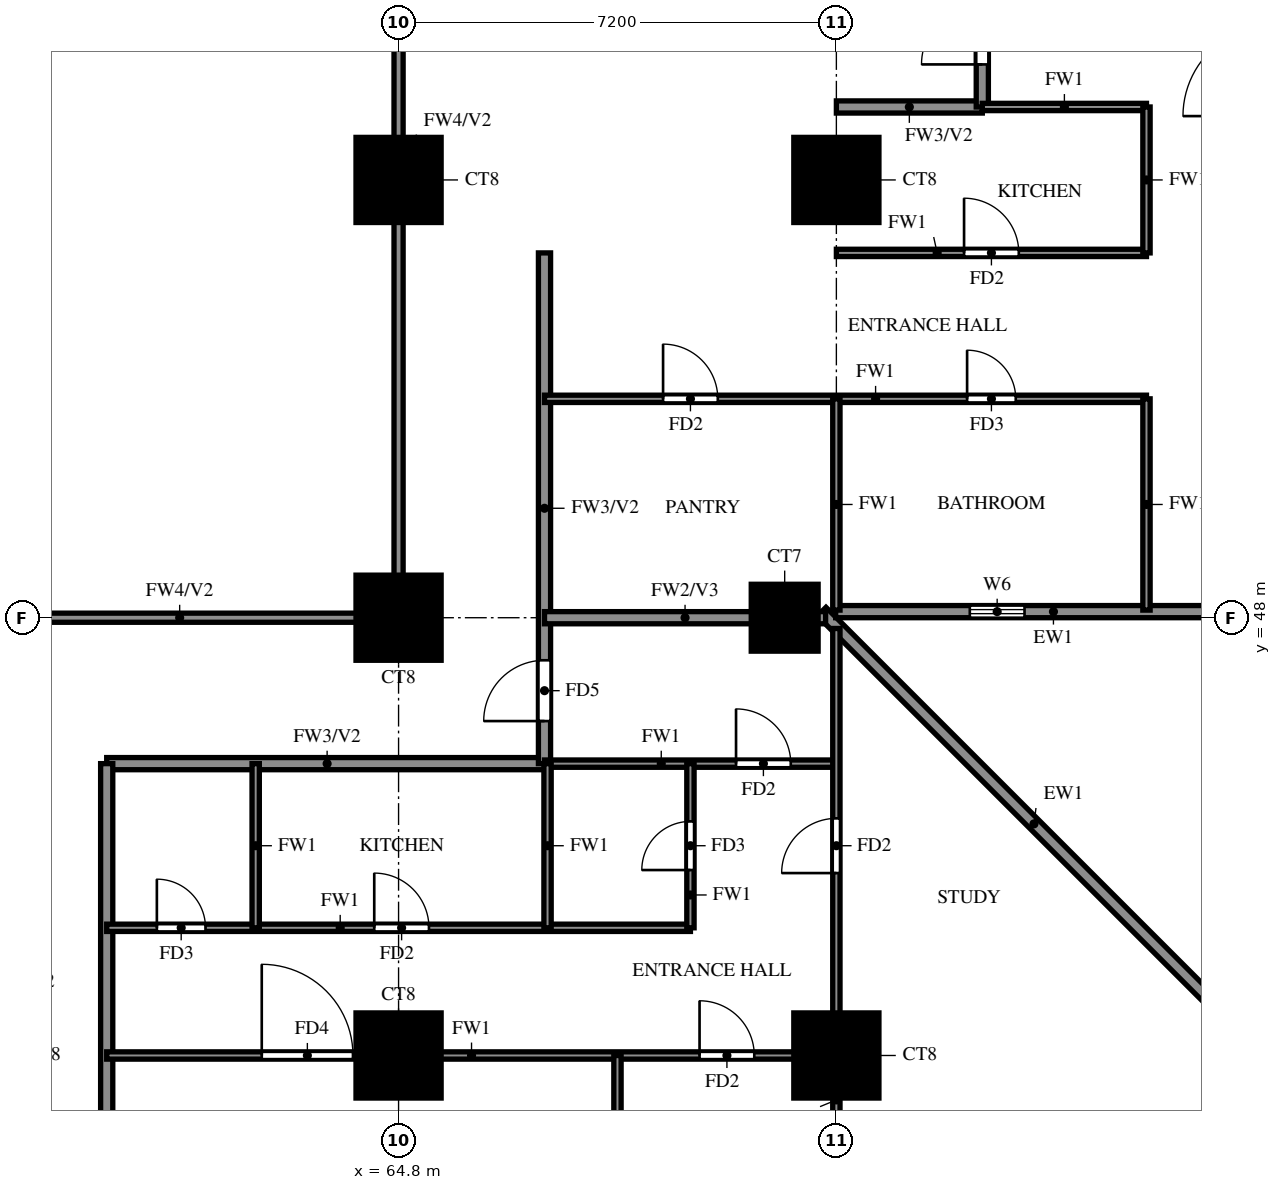
"""IFC4 building model, lengths in metres.
Left out: names, types, materials, properties, quantities, classifications, styles, units other than length and angle.
Written with IfcOpenShell. Run it as: python <this file> out.ifc"""

import sys

from ifc_helpers import new_model, si_unit, direction, frame, frame_2d, origin, origin_2d, place, context, subcontext, project, spatial, rectangle, extrude, source, transform, mapped, element, fill, save


model = new_model("IFC4")
c1 = context("Model", 3, precision=1e-05, world=origin(), true_north=direction((0.0, 1.0)))
c2 = subcontext(c1, "Body", "Model", "MODEL_VIEW")
j1 = project(units=[si_unit("LENGTHUNIT", "METRE"), si_unit("PLANEANGLEUNIT", "RADIAN")], contexts=[c1])
p1 = place(None, origin())
s1 = spatial("IfcSite", under=j1, at=p1, CompositionType="ELEMENT")
p2 = place(p1, origin())
s2 = spatial("IfcBuilding", under=s1, at=p2, CompositionType="ELEMENT")
p3 = place(p2, frame((0.0, 0.0, 30.5)))
s3 = spatial("IfcBuildingStorey", under=s2, at=p3, CompositionType="ELEMENT", Elevation=30.5)
m1 = source(origin(), c2, "Body", "SweptSolid", [
    extrude(rectangle(XDim=1.4, YDim=1.4, at=origin_2d()), origin(), (0.0, 0.0, 1.0), 3.18),
])
for number, where, z_axis, x_axis in (
    (1, (64.8, 40.8, 0.0), (0.0, 0.0, 1.0), (1.0, 0.0, 0.0)),
    (2, (72.0, 40.8, 0.0), (0.0, 0.0, 1.0), (1.0, 0.0, 0.0)),
    (3, (64.8, 48.0, 0.0), (0.0, 0.0, 1.0), (1.0, 0.0, 0.0)),
):
    element("IfcColumn", number, at=place(p3, frame(where, z_axis=z_axis, x_axis=x_axis)), inside=s3, PredefinedType="COLUMN", context=c2, shape_type="MappedRepresentation", body=[
        mapped(m1, transform((0.0, 0.0, 0.0))),
    ])
m2 = source(origin(), c2, "Body", "SweptSolid", [
    extrude(rectangle(XDim=1.1, YDim=1.1, at=origin_2d()), origin(), (0.0, 0.0, 1.0), 3.18),
])
p4 = place(p3, frame((71.15, 48.0, 0.0), z_axis=(0.0, 0.0, 1.0), x_axis=(1.0, 0.0, 0.0)))
e4 = element("IfcColumn", 4, at=p4, inside=s3, PredefinedType="COLUMN", context=c2, shape_type="MappedRepresentation", body=[
    mapped(m2, transform((0.0, 0.0, 0.0))),
])
for number, where, z_axis, x_axis in (
    (5, (64.8, 55.2, 0.0), (0.0, 0.0, 1.0), (1.0, 0.0, 0.0)),
    (6, (72.0, 55.2, 0.0), (0.0, 0.0, 1.0), (1.0, 0.0, 0.0)),
):
    element("IfcColumn", number, at=place(p3, frame(where, z_axis=z_axis, x_axis=x_axis)), inside=s3, PredefinedType="COLUMN", context=c2, shape_type="MappedRepresentation", body=[
        mapped(m1, transform((0.0, 0.0, 0.0))),
    ])
p5 = place(p3, frame((78.74, 41.118, 0.0), z_axis=(0.0, 0.0, 1.0), x_axis=(-0.707106781187, 0.707106781187, 0.0)))
e7 = element("IfcWall", 7, at=p5, inside=s3, PredefinedType="SOLIDWALL", context=c2, shape_type="SweptSolid", body=[
    extrude(rectangle(XDim=9.874, YDim=0.2, at=frame_2d((4.937, 0.0))), origin(), (0.0, 0.0, 1.0), 3.18),
])
p6 = place(p3, frame((71.989, 48.1, 0.0), z_axis=(0.0, 0.0, 1.0), x_axis=(1.0, 0.0, 0.0)))
e8 = element("IfcWall", 8, at=p6, inside=s3, PredefinedType="SOLIDWALL", context=c2, shape_type="SweptSolid", body=[
    extrude(rectangle(XDim=6.511, YDim=0.2, at=frame_2d((3.256, 0.0))), origin(), (0.0, 0.0, 1.0), 3.18),
])
p7 = place(p6, frame((2.206, 0.0, 1.5)))
e9 = element("IfcOpeningElement", 9, at=p7, cuts=e8, PredefinedType="OPENING", context=c2, shape_type="SweptSolid", body=[
    extrude(rectangle(XDim=0.9, YDim=0.9, at=frame_2d((0.45, 0.45))), frame((0.0, 0.11, 0.0), z_axis=(0.0, -1.0, 0.0), x_axis=(1.0, 0.0, 0.0)), (0.0, 0.0, 1.0), 0.22),
])
p8 = place(p3, frame((60.0, 45.6, 0.0), z_axis=(0.0, 0.0, 1.0), x_axis=(1.0, 0.0, 0.0)))
e10 = element("IfcWall", 10, at=p8, inside=s3, PredefinedType="SOLIDWALL", context=c2, shape_type="SweptSolid", body=[
    extrude(rectangle(XDim=7.25, YDim=0.2, at=frame_2d((3.625, 0.0))), origin(), (0.0, 0.0, 1.0), 3.18),
])
p9 = place(p3, frame((72.0, 56.4, 0.0), z_axis=(0.0, 0.0, 1.0), x_axis=(1.0, 0.0, 0.0)))
e11 = element("IfcWall", 11, at=p9, inside=s3, PredefinedType="SOLIDWALL", context=c2, shape_type="SweptSolid", body=[
    extrude(rectangle(XDim=2.4, YDim=0.2, at=frame_2d((1.2, 0.0))), origin(), (0.0, 0.0, 1.0), 3.18),
])
p10 = place(p3, frame((60.0, 33.725, 0.0), z_axis=(0.0, 0.0, 1.0), x_axis=(0.0, 1.0, 0.0)))
e12 = element("IfcWall", 12, at=p10, inside=s3, PredefinedType="SOLIDWALL", context=c2, shape_type="SweptSolid", body=[
    extrude(rectangle(XDim=11.875, YDim=0.2, at=frame_2d((5.938, 0.0))), origin(), (0.0, 0.0, 1.0), 2.28),
])
p11 = place(p3, frame((67.2, 45.6, 0.0), z_axis=(0.0, 0.0, 1.0), x_axis=(0.0, 1.0, 0.0)))
e13 = element("IfcWall", 13, at=p11, inside=s3, PredefinedType="SOLIDWALL", context=c2, shape_type="SweptSolid", body=[
    extrude(rectangle(XDim=8.4, YDim=0.2, at=frame_2d((4.2, 0.0))), origin(), (0.0, 0.0, 1.0), 3.18),
])
p12 = place(p11, frame((0.7, 0.0, 0.0)))
e14 = element("IfcOpeningElement", 14, at=p12, cuts=e13, PredefinedType="OPENING", context=c2, shape_type="SweptSolid", body=[
    extrude(rectangle(XDim=1.0, YDim=2.1, at=frame_2d((0.5, 1.05))), frame((0.0, 0.11, 0.0), z_axis=(0.0, -1.0, 0.0), x_axis=(1.0, 0.0, 0.0)), (0.0, 0.0, 1.0), 0.22),
])
p13 = place(p3, frame((74.4, 56.4, 0.0), z_axis=(0.0, 0.0, 1.0), x_axis=(0.0, 1.0, 0.0)))
e15 = element("IfcWall", 15, at=p13, inside=s3, PredefinedType="SOLIDWALL", context=c2, shape_type="SweptSolid", body=[
    extrude(rectangle(XDim=9.6, YDim=0.2, at=frame_2d((4.8, 0.0))), origin(), (0.0, 0.0, 1.0), 3.18),
])
p14 = place(p13, frame((0.7, 0.0, 0.0)))
e16 = element("IfcOpeningElement", 16, at=p14, cuts=e15, PredefinedType="OPENING", context=c2, shape_type="SweptSolid", body=[
    extrude(rectangle(XDim=1.0, YDim=2.1, at=frame_2d((0.5, 1.05))), frame((0.0, 0.11, 0.0), z_axis=(0.0, -1.0, 0.0), x_axis=(1.0, 0.0, 0.0)), (0.0, 0.0, 1.0), 0.22),
])
p15 = place(p13, frame((3.1, 0.0, 0.0)))
e17 = element("IfcOpeningElement", 17, at=p15, cuts=e15, PredefinedType="OPENING", context=c2, shape_type="SweptSolid", body=[
    extrude(rectangle(XDim=1.0, YDim=2.1, at=frame_2d((0.5, 1.05))), frame((0.0, 0.11, 0.0), z_axis=(0.0, -1.0, 0.0), x_axis=(1.0, 0.0, 0.0)), (0.0, 0.0, 1.0), 0.22),
])
p16 = place(p3, frame((67.2, 48.0, 0.0), z_axis=(0.0, 0.0, 1.0), x_axis=(1.0, 0.0, 0.0)))
e18 = element("IfcWall", 18, at=p16, inside=s3, PredefinedType="SOLIDWALL", context=c2, shape_type="SweptSolid", body=[
    extrude(rectangle(XDim=4.623, YDim=0.2, at=frame_2d((2.312, 0.0))), origin(), (0.0, 0.0, 1.0), 3.18),
])
p17 = place(p3, frame((60.0, 40.8, 0.0), z_axis=(0.0, 0.0, 1.0), x_axis=(1.0, 0.0, 0.0)))
e19 = element("IfcWall", 19, at=p17, inside=s3, PredefinedType="PARTITIONING", context=c2, shape_type="SweptSolid", body=[
    extrude(rectangle(XDim=12.0, YDim=0.12, at=frame_2d((6.0, 0.0))), origin(), (0.0, 0.0, 1.0), 3.18),
])
p18 = place(p17, frame((9.75, 0.0, 0.0)))
e20 = element("IfcOpeningElement", 20, at=p18, cuts=e19, PredefinedType="OPENING", context=c2, shape_type="SweptSolid", body=[
    extrude(rectangle(XDim=0.9, YDim=2.1, at=frame_2d((0.45, 1.05))), frame((0.0, 0.07, 0.0), z_axis=(0.0, -1.0, 0.0), x_axis=(1.0, 0.0, 0.0)), (0.0, 0.0, 1.0), 0.14),
])
p19 = place(p17, frame((2.55, 0.0, 0.0)))
e21 = element("IfcOpeningElement", 21, at=p19, cuts=e19, PredefinedType="OPENING", context=c2, shape_type="SweptSolid", body=[
    extrude(rectangle(XDim=1.5, YDim=2.1, at=frame_2d((0.75, 1.05))), frame((0.0, 0.07, 0.0), z_axis=(0.0, -1.0, 0.0), x_axis=(1.0, 0.0, 0.0)), (0.0, 0.0, 1.0), 0.14),
])
p20 = place(p3, frame((60.0, 42.9, 0.0), z_axis=(0.0, 0.0, 1.0), x_axis=(1.0, 0.0, 0.0)))
e22 = element("IfcWall", 22, at=p20, inside=s3, PredefinedType="PARTITIONING", context=c2, shape_type="SweptSolid", body=[
    extrude(rectangle(XDim=9.6, YDim=0.12, at=frame_2d((4.8, 0.0))), origin(), (0.0, 0.0, 1.0), 3.18),
])
p21 = place(p20, frame((4.4, 0.0, 0.0)))
e23 = element("IfcOpeningElement", 23, at=p21, cuts=e22, PredefinedType="OPENING", context=c2, shape_type="SweptSolid", body=[
    extrude(rectangle(XDim=0.9, YDim=2.1, at=frame_2d((0.45, 1.05))), frame((0.0, 0.07, 0.0), z_axis=(0.0, -1.0, 0.0), x_axis=(1.0, 0.0, 0.0)), (0.0, 0.0, 1.0), 0.14),
])
p22 = place(p20, frame((0.825, 0.0, 0.0)))
e24 = element("IfcOpeningElement", 24, at=p22, cuts=e22, PredefinedType="OPENING", context=c2, shape_type="SweptSolid", body=[
    extrude(rectangle(XDim=0.8, YDim=2.1, at=frame_2d((0.4, 1.05))), frame((0.0, 0.07, 0.0), z_axis=(0.0, -1.0, 0.0), x_axis=(1.0, 0.0, 0.0)), (0.0, 0.0, 1.0), 0.14),
])
p23 = place(p3, frame((67.2, 45.6, 0.0), z_axis=(0.0, 0.0, 1.0), x_axis=(1.0, 0.0, 0.0)))
e25 = element("IfcWall", 25, at=p23, inside=s3, PredefinedType="PARTITIONING", context=c2, shape_type="SweptSolid", body=[
    extrude(rectangle(XDim=4.8, YDim=0.12, at=frame_2d((2.4, 0.0))), origin(), (0.0, 0.0, 1.0), 3.18),
])
p24 = place(p23, frame((3.15, 0.0, 0.0)))
e26 = element("IfcOpeningElement", 26, at=p24, cuts=e25, PredefinedType="OPENING", context=c2, shape_type="SweptSolid", body=[
    extrude(rectangle(XDim=0.9, YDim=2.1, at=frame_2d((0.45, 1.05))), frame((0.0, 0.07, 0.0), z_axis=(0.0, -1.0, 0.0), x_axis=(1.0, 0.0, 0.0)), (0.0, 0.0, 1.0), 0.14),
])
p25 = place(p3, frame((67.2, 51.6, 0.0), z_axis=(0.0, 0.0, 1.0), x_axis=(1.0, 0.0, 0.0)))
e27 = element("IfcWall", 27, at=p25, inside=s3, PredefinedType="PARTITIONING", context=c2, shape_type="SweptSolid", body=[
    extrude(rectangle(XDim=9.9, YDim=0.12, at=frame_2d((4.95, 0.0))), origin(), (0.0, 0.0, 1.0), 3.18),
])
p26 = place(p25, frame((6.95, 0.0, 0.0)))
e28 = element("IfcOpeningElement", 28, at=p26, cuts=e27, PredefinedType="OPENING", context=c2, shape_type="SweptSolid", body=[
    extrude(rectangle(XDim=0.8, YDim=2.1, at=frame_2d((0.4, 1.05))), frame((0.0, 0.07, 0.0), z_axis=(0.0, -1.0, 0.0), x_axis=(1.0, 0.0, 0.0)), (0.0, 0.0, 1.0), 0.14),
])
p27 = place(p25, frame((1.95, 0.0, 0.0)))
e29 = element("IfcOpeningElement", 29, at=p27, cuts=e27, PredefinedType="OPENING", context=c2, shape_type="SweptSolid", body=[
    extrude(rectangle(XDim=0.9, YDim=2.1, at=frame_2d((0.45, 1.05))), frame((0.0, 0.07, 0.0), z_axis=(0.0, -1.0, 0.0), x_axis=(1.0, 0.0, 0.0)), (0.0, 0.0, 1.0), 0.14),
])
p28 = place(p3, frame((72.0, 54.0, 0.0), z_axis=(0.0, 0.0, 1.0), x_axis=(1.0, 0.0, 0.0)))
e30 = element("IfcWall", 30, at=p28, inside=s3, PredefinedType="PARTITIONING", context=c2, shape_type="SweptSolid", body=[
    extrude(rectangle(XDim=5.1, YDim=0.12, at=frame_2d((2.55, 0.0))), origin(), (0.0, 0.0, 1.0), 3.18),
])
p29 = place(p28, frame((2.1, 0.0, 0.0)))
e31 = element("IfcOpeningElement", 31, at=p29, cuts=e30, PredefinedType="OPENING", context=c2, shape_type="SweptSolid", body=[
    extrude(rectangle(XDim=0.9, YDim=2.1, at=frame_2d((0.45, 1.05))), frame((0.0, 0.07, 0.0), z_axis=(0.0, -1.0, 0.0), x_axis=(1.0, 0.0, 0.0)), (0.0, 0.0, 1.0), 0.14),
])
for number, where, z_axis, x_axis in (
    (32, (74.4, 56.4, 0.0), (0.0, 0.0, 1.0), (1.0, 0.0, 0.0)),
    (33, (62.45, 42.9, 0.0), (0.0, 0.0, 1.0), (0.0, 1.0, 0.0)),
    (34, (67.25, 42.9, 0.0), (0.0, 0.0, 1.0), (0.0, 1.0, 0.0)),
):
    element("IfcWall", number, at=place(p3, frame(where, z_axis=z_axis, x_axis=x_axis)), inside=s3, PredefinedType="PARTITIONING", context=c2, shape_type="SweptSolid", body=[
        extrude(rectangle(XDim=2.7, YDim=0.12, at=frame_2d((1.35, 0.0))), origin(), (0.0, 0.0, 1.0), 3.18),
    ])
p30 = place(p3, frame((68.4, 33.725, 0.0), z_axis=(0.0, 0.0, 1.0), x_axis=(0.0, 1.0, 0.0)))
e35 = element("IfcWall", 35, at=p30, inside=s3, PredefinedType="PARTITIONING", context=c2, shape_type="SweptSolid", body=[
    extrude(rectangle(XDim=7.075, YDim=0.12, at=frame_2d((3.538, 0.0))), origin(), (0.0, 0.0, 1.0), 2.28),
])
p31 = place(p3, frame((69.6, 42.9, 0.0), z_axis=(0.0, 0.0, 1.0), x_axis=(0.0, 1.0, 0.0)))
e36 = element("IfcWall", 36, at=p31, inside=s3, PredefinedType="PARTITIONING", context=c2, shape_type="SweptSolid", body=[
    extrude(rectangle(XDim=2.7, YDim=0.12, at=frame_2d((1.35, 0.0))), origin(), (0.0, 0.0, 1.0), 3.18),
])
p32 = place(p31, frame((0.95, 0.0, 0.0)))
e37 = element("IfcOpeningElement", 37, at=p32, cuts=e36, PredefinedType="OPENING", context=c2, shape_type="SweptSolid", body=[
    extrude(rectangle(XDim=0.8, YDim=2.1, at=frame_2d((0.4, 1.05))), frame((0.0, 0.07, 0.0), z_axis=(0.0, -1.0, 0.0), x_axis=(1.0, 0.0, 0.0)), (0.0, 0.0, 1.0), 0.14),
])
p33 = place(p3, frame((72.0, 33.725, 0.0), z_axis=(0.0, 0.0, 1.0), x_axis=(0.0, 1.0, 0.0)))
e38 = element("IfcWall", 38, at=p33, inside=s3, PredefinedType="PARTITIONING", context=c2, shape_type="SweptSolid", body=[
    extrude(rectangle(XDim=14.098, YDim=0.12, at=frame_2d((7.049, 0.0))), origin(), (0.0, 0.0, 1.0), 2.28),
])
p34 = place(p33, frame((10.075, 0.0, 0.0)))
e39 = element("IfcOpeningElement", 39, at=p34, cuts=e38, PredefinedType="OPENING", context=c2, shape_type="SweptSolid", body=[
    extrude(rectangle(XDim=0.9, YDim=2.1, at=frame_2d((0.45, 1.05))), frame((0.0, 0.07, 0.0), z_axis=(0.0, -1.0, 0.0), x_axis=(1.0, 0.0, 0.0)), (0.0, 0.0, 1.0), 0.14),
])
for number, where, z_axis, x_axis in (
    (40, (72.0, 48.125, 0.0), (0.0, 0.0, 1.0), (0.0, 1.0, 0.0)),
    (41, (77.1, 48.125, 0.0), (0.0, 0.0, 1.0), (0.0, 1.0, 0.0)),
):
    element("IfcWall", number, at=place(p3, frame(where, z_axis=z_axis, x_axis=x_axis)), inside=s3, PredefinedType="PARTITIONING", context=c2, shape_type="SweptSolid", body=[
        extrude(rectangle(XDim=3.475, YDim=0.12, at=frame_2d((1.738, 0.0))), origin(), (0.0, 0.0, 1.0), 3.18),
    ])
p35 = place(p3, frame((77.1, 54.0, 0.0), z_axis=(0.0, 0.0, 1.0), x_axis=(0.0, 1.0, 0.0)))
e42 = element("IfcWall", 42, at=p35, inside=s3, PredefinedType="PARTITIONING", context=c2, shape_type="SweptSolid", body=[
    extrude(rectangle(XDim=2.4, YDim=0.12, at=frame_2d((1.2, 0.0))), origin(), (0.0, 0.0, 1.0), 3.18),
])
p36 = place(p3, frame((57.6, 48.0, 0.0), z_axis=(0.0, 0.0, 1.0), x_axis=(1.0, 0.0, 0.0)))
e43 = element("IfcWall", 43, at=p36, inside=s3, PredefinedType="SOLIDWALL", context=c2, shape_type="SweptSolid", body=[
    extrude(rectangle(XDim=7.2, YDim=0.15, at=frame_2d((3.6, 0.0))), origin(), (0.0, 0.0, 1.0), 2.28),
])
p37 = place(p3, frame((64.8, 48.0, 0.0), z_axis=(0.0, 0.0, 1.0), x_axis=(0.0, 1.0, 0.0)))
e44 = element("IfcWall", 44, at=p37, inside=s3, PredefinedType="SOLIDWALL", context=c2, shape_type="SweptSolid", body=[
    extrude(rectangle(XDim=14.4, YDim=0.15, at=frame_2d((7.2, 0.0))), origin(), (0.0, 0.0, 1.0), 2.28),
])
p38 = place(p7, origin())
e45 = element("IfcWindow", 45, at=p38, inside=s3, PartitioningType="SINGLE_PANEL", PredefinedType="WINDOW", context=c2, shape_type="SweptSolid", body=[
    extrude(rectangle(XDim=0.9, YDim=0.9, at=frame_2d((0.45, 0.45))), frame((0.0, 0.03, 0.0), z_axis=(0.0, -1.0, 0.0), x_axis=(1.0, 0.0, 0.0)), (0.0, 0.0, 1.0), 0.06),
])
fill(e9, e45)
p39 = place(p14, origin())
e46 = element("IfcDoor", 46, at=p39, inside=s3, OperationType="SINGLE_SWING_LEFT", PredefinedType="DOOR", context=c2, shape_type="SweptSolid", body=[
    extrude(rectangle(XDim=1.0, YDim=2.1, at=frame_2d((0.5, 1.05))), frame((0.0, 0.025, 0.0), z_axis=(0.0, -1.0, 0.0), x_axis=(1.0, 0.0, 0.0)), (0.0, 0.0, 1.0), 0.05),
])
fill(e16, e46)
p40 = place(p26, origin())
e47 = element("IfcDoor", 47, at=p40, inside=s3, OperationType="SINGLE_SWING_RIGHT", PredefinedType="DOOR", context=c2, shape_type="SweptSolid", body=[
    extrude(rectangle(XDim=0.8, YDim=2.1, at=frame_2d((0.4, 1.05))), frame((0.0, 0.025, 0.0), z_axis=(0.0, -1.0, 0.0), x_axis=(1.0, 0.0, 0.0)), (0.0, 0.0, 1.0), 0.05),
])
fill(e28, e47)
p41 = place(p29, origin())
e48 = element("IfcDoor", 48, at=p41, inside=s3, OperationType="SINGLE_SWING_LEFT", PredefinedType="DOOR", context=c2, shape_type="SweptSolid", body=[
    extrude(rectangle(XDim=0.9, YDim=2.1, at=frame_2d((0.45, 1.05))), frame((0.0, 0.025, 0.0), z_axis=(0.0, -1.0, 0.0), x_axis=(1.0, 0.0, 0.0)), (0.0, 0.0, 1.0), 0.05),
])
fill(e31, e48)
p42 = place(p27, origin())
e49 = element("IfcDoor", 49, at=p42, inside=s3, OperationType="SINGLE_SWING_LEFT", PredefinedType="DOOR", context=c2, shape_type="SweptSolid", body=[
    extrude(rectangle(XDim=0.9, YDim=2.1, at=frame_2d((0.45, 1.05))), frame((0.0, 0.025, 0.0), z_axis=(0.0, -1.0, 0.0), x_axis=(1.0, 0.0, 0.0)), (0.0, 0.0, 1.0), 0.05),
])
fill(e29, e49)
p43 = place(p24, origin())
e50 = element("IfcDoor", 50, at=p43, inside=s3, OperationType="SINGLE_SWING_LEFT", PredefinedType="DOOR", context=c2, shape_type="SweptSolid", body=[
    extrude(rectangle(XDim=0.9, YDim=2.1, at=frame_2d((0.45, 1.05))), frame((0.0, 0.025, 0.0), z_axis=(0.0, -1.0, 0.0), x_axis=(1.0, 0.0, 0.0)), (0.0, 0.0, 1.0), 0.05),
])
fill(e26, e50)
p44 = place(p12, origin())
e51 = element("IfcDoor", 51, at=p44, inside=s3, OperationType="SINGLE_SWING_LEFT", PredefinedType="DOOR", context=c2, shape_type="SweptSolid", body=[
    extrude(rectangle(XDim=1.0, YDim=2.1, at=frame_2d((0.5, 1.05))), frame((0.0, 0.025, 0.0), z_axis=(0.0, -1.0, 0.0), x_axis=(1.0, 0.0, 0.0)), (0.0, 0.0, 1.0), 0.05),
])
fill(e14, e51)
p45 = place(p18, origin())
e52 = element("IfcDoor", 52, at=p45, inside=s3, OperationType="SINGLE_SWING_RIGHT", PredefinedType="DOOR", context=c2, shape_type="SweptSolid", body=[
    extrude(rectangle(XDim=0.9, YDim=2.1, at=frame_2d((0.45, 1.05))), frame((0.0, 0.025, 0.0), z_axis=(0.0, -1.0, 0.0), x_axis=(1.0, 0.0, 0.0)), (0.0, 0.0, 1.0), 0.05),
])
fill(e20, e52)
p46 = place(p19, origin())
e53 = element("IfcDoor", 53, at=p46, inside=s3, OperationType="SINGLE_SWING_RIGHT", PredefinedType="DOOR", context=c2, shape_type="SweptSolid", body=[
    extrude(rectangle(XDim=1.5, YDim=2.1, at=frame_2d((0.75, 1.05))), frame((0.0, 0.025, 0.0), z_axis=(0.0, -1.0, 0.0), x_axis=(1.0, 0.0, 0.0)), (0.0, 0.0, 1.0), 0.05),
])
fill(e21, e53)
p47 = place(p32, origin())
e54 = element("IfcDoor", 54, at=p47, inside=s3, OperationType="SINGLE_SWING_LEFT", PredefinedType="DOOR", context=c2, shape_type="SweptSolid", body=[
    extrude(rectangle(XDim=0.8, YDim=2.1, at=frame_2d((0.4, 1.05))), frame((0.0, 0.025, 0.0), z_axis=(0.0, -1.0, 0.0), x_axis=(1.0, 0.0, 0.0)), (0.0, 0.0, 1.0), 0.05),
])
fill(e37, e54)
p48 = place(p21, origin())
e55 = element("IfcDoor", 55, at=p48, inside=s3, OperationType="SINGLE_SWING_RIGHT", PredefinedType="DOOR", context=c2, shape_type="SweptSolid", body=[
    extrude(rectangle(XDim=0.9, YDim=2.1, at=frame_2d((0.45, 1.05))), frame((0.0, 0.025, 0.0), z_axis=(0.0, -1.0, 0.0), x_axis=(1.0, 0.0, 0.0)), (0.0, 0.0, 1.0), 0.05),
])
fill(e23, e55)
p49 = place(p22, origin())
e56 = element("IfcDoor", 56, at=p49, inside=s3, OperationType="SINGLE_SWING_LEFT", PredefinedType="DOOR", context=c2, shape_type="SweptSolid", body=[
    extrude(rectangle(XDim=0.8, YDim=2.1, at=frame_2d((0.4, 1.05))), frame((0.0, 0.025, 0.0), z_axis=(0.0, -1.0, 0.0), x_axis=(1.0, 0.0, 0.0)), (0.0, 0.0, 1.0), 0.05),
])
fill(e24, e56)
p50 = place(p34, origin())
e57 = element("IfcDoor", 57, at=p50, inside=s3, OperationType="SINGLE_SWING_LEFT", PredefinedType="DOOR", context=c2, shape_type="SweptSolid", body=[
    extrude(rectangle(XDim=0.9, YDim=2.1, at=frame_2d((0.45, 1.05))), frame((0.0, 0.025, 0.0), z_axis=(0.0, -1.0, 0.0), x_axis=(1.0, 0.0, 0.0)), (0.0, 0.0, 1.0), 0.05),
])
fill(e39, e57)
save(model, sys.argv[1])
